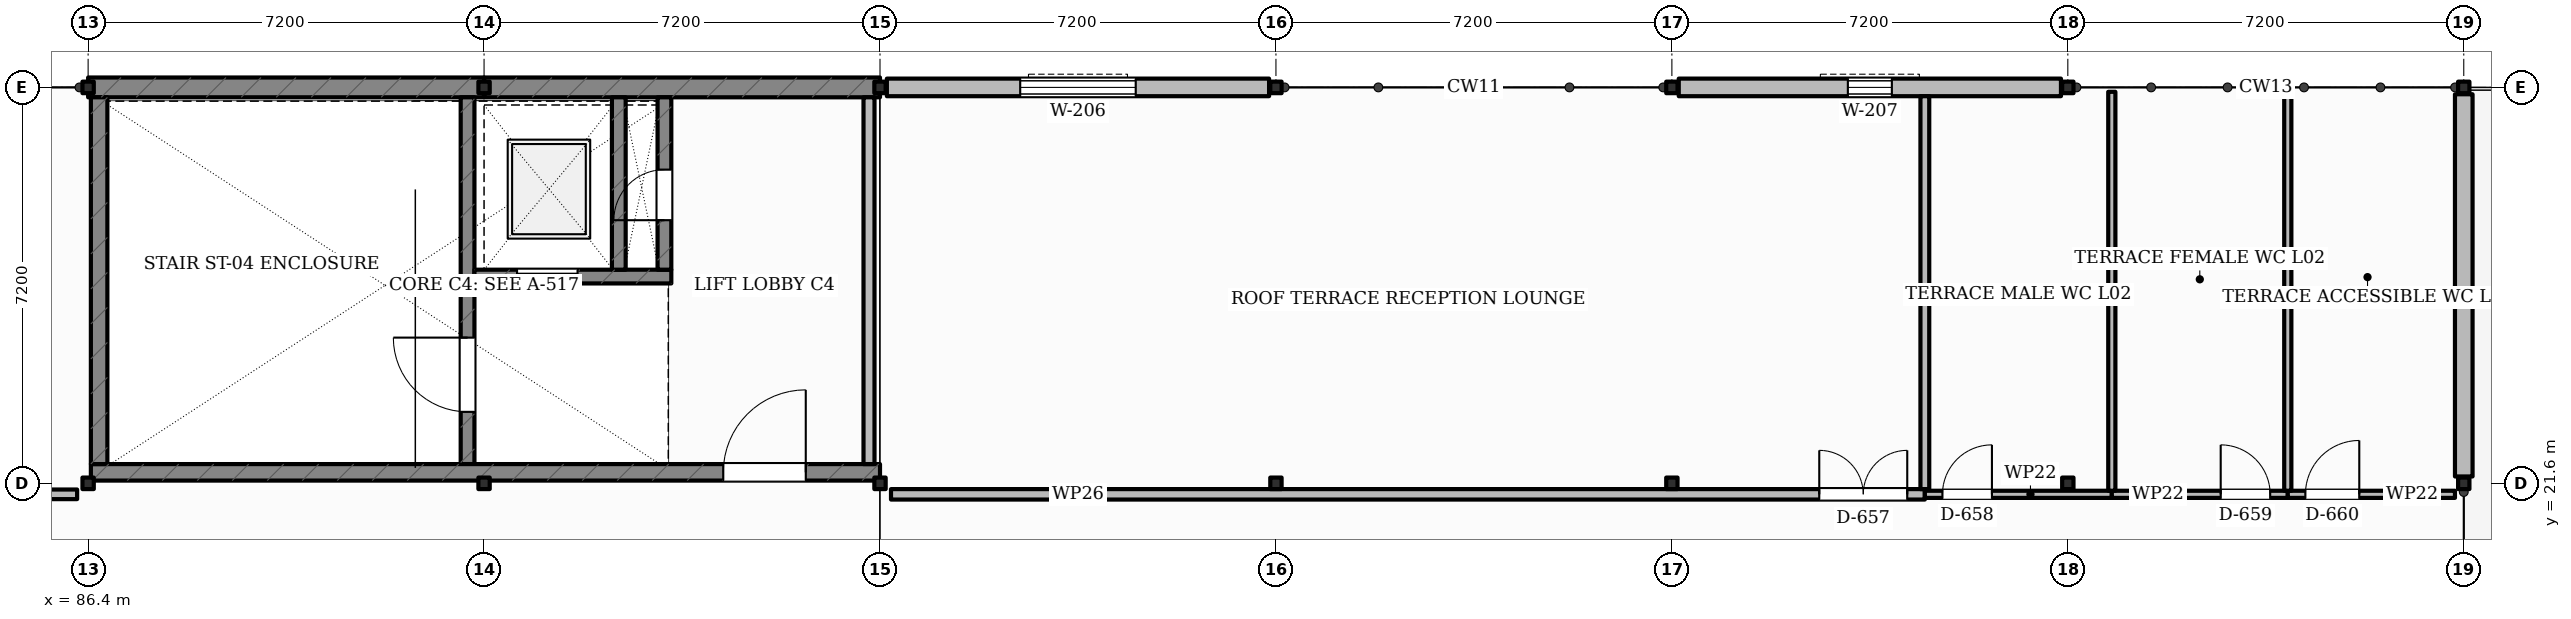
"""IFC4 building model, lengths in metres.
Left out: names, types, materials, properties, quantities, classifications, styles, units other than length and angle.
Written with IfcOpenShell. Run it as: python <this file> out.ifc"""

import sys

from ifc_helpers import new_model, si_unit, direction, frame, frame_2d, origin, origin_2d, place, context, subcontext, project, spatial, rectangle, i_section, extrude, element, fill, save


model = new_model("IFC4")
c1 = context("Model", 3, precision=1e-05, world=origin(), true_north=direction((0.0, 1.0)))
c2 = subcontext(c1, "Body", "Model", "MODEL_VIEW")
j1 = project(units=[si_unit("LENGTHUNIT", "METRE"), si_unit("PLANEANGLEUNIT", "RADIAN")], contexts=[c1])
p1 = place(None, origin())
s1 = spatial("IfcSite", under=j1, at=p1, CompositionType="ELEMENT")
p2 = place(p1, origin())
s2 = spatial("IfcBuilding", under=s1, at=p2, CompositionType="ELEMENT")
p3 = place(p2, frame((0.0, 0.0, 9.9)))
s3 = spatial("IfcBuildingStorey", under=s2, at=p3, CompositionType="ELEMENT", Elevation=9.9)
for number, where, z_axis, x_axis in (
    (1, (86.4, 21.6, 0.0), (0.0, 0.0, 1.0), (1.0, 0.0, 0.0)),
    (2, (86.4, 28.8, 0.0), (0.0, 0.0, 1.0), (1.0, 0.0, 0.0)),
    (3, (93.6, 21.6, 0.0), (0.0, 0.0, 1.0), (1.0, 0.0, 0.0)),
    (4, (93.6, 28.8, 0.0), (0.0, 0.0, 1.0), (1.0, 0.0, 0.0)),
    (5, (100.8, 21.6, 0.0), (0.0, 0.0, 1.0), (1.0, 0.0, 0.0)),
    (6, (100.8, 28.8, 0.0), (0.0, 0.0, 1.0), (1.0, 0.0, 0.0)),
    (7, (108.0, 21.6, 0.0), (0.0, 0.0, 1.0), (1.0, 0.0, 0.0)),
    (8, (108.0, 28.8, 0.0), (0.0, 0.0, 1.0), (1.0, 0.0, 0.0)),
    (9, (115.2, 21.6, 0.0), (0.0, 0.0, 1.0), (1.0, 0.0, 0.0)),
    (10, (115.2, 28.8, 0.0), (0.0, 0.0, 1.0), (1.0, 0.0, 0.0)),
    (11, (122.4, 21.6, 0.0), (0.0, 0.0, 1.0), (1.0, 0.0, 0.0)),
    (12, (122.4, 28.8, 0.0), (0.0, 0.0, 1.0), (1.0, 0.0, 0.0)),
    (13, (129.6, 21.6, 0.0), (0.0, 0.0, 1.0), (1.0, 0.0, 0.0)),
    (14, (129.6, 28.8, 0.0), (0.0, 0.0, 1.0), (1.0, 0.0, 0.0)),
):
    element("IfcColumn", number, at=place(p3, frame(where, z_axis=z_axis, x_axis=x_axis)), inside=s3, PredefinedType="COLUMN", context=c2, shape_type="SweptSolid", body=[
        extrude(i_section(OverallWidth=0.206, OverallDepth=0.21, WebThickness=0.01, FlangeThickness=0.014, FilletRadius=0.01, at=origin_2d()), origin(), (0.0, 0.0, 1.0), 4.5),
    ])
p4 = place(p3, frame((86.4, 28.8, 0.0), z_axis=(0.0, 0.0, 1.0), x_axis=(1.0, 0.0, 0.0)))
e15 = element("IfcWall", 15, at=p4, inside=s3, PredefinedType="SHEAR", context=c2, shape_type="SweptSolid", body=[
    extrude(rectangle(XDim=7.2, YDim=0.36, at=frame_2d((3.6, 0.0))), origin(), (0.0, 0.0, 1.0), 3.605),
])
p5 = place(p3, frame((93.6, 28.8, 0.0), z_axis=(0.0, 0.0, 1.0), x_axis=(1.0, 0.0, 0.0)))
e16 = element("IfcWall", 16, at=p5, inside=s3, PredefinedType="SHEAR", context=c2, shape_type="SweptSolid", body=[
    extrude(rectangle(XDim=7.2, YDim=0.36, at=frame_2d((3.6, 0.0))), origin(), (0.0, 0.0, 1.0), 3.455),
])
p6 = place(p3, frame((100.925, 28.8, 0.0), z_axis=(0.0, 0.0, 1.0), x_axis=(1.0, 0.0, 0.0)))
e17 = element("IfcWall", 17, at=p6, inside=s3, PredefinedType="SOLIDWALL", context=c2, shape_type="SweptSolid", body=[
    extrude(rectangle(XDim=6.95, YDim=0.32, at=frame_2d((3.475, 0.0))), origin(), (0.0, 0.0, 1.0), 3.455),
])
p7 = place(p6, frame((2.425, 0.0, 1.05)))
e18 = element("IfcOpeningElement", 18, at=p7, cuts=e17, PredefinedType="OPENING", context=c2, shape_type="SweptSolid", body=[
    extrude(rectangle(XDim=2.1, YDim=1.8, at=frame_2d((1.05, 0.9))), frame((0.0, 0.17, 0.0), z_axis=(0.0, -1.0, 0.0), x_axis=(1.0, 0.0, 0.0)), (0.0, 0.0, 1.0), 0.34),
])
p8 = place(p3, frame((115.325, 28.8, 0.0), z_axis=(0.0, 0.0, 1.0), x_axis=(1.0, 0.0, 0.0)))
e19 = element("IfcWall", 19, at=p8, inside=s3, PredefinedType="SOLIDWALL", context=c2, shape_type="SweptSolid", body=[
    extrude(rectangle(XDim=6.95, YDim=0.32, at=frame_2d((3.475, 0.0))), origin(), (0.0, 0.0, 1.0), 3.605),
])
p9 = place(p8, frame((3.075, 0.0, 1.05)))
e20 = element("IfcOpeningElement", 20, at=p9, cuts=e19, PredefinedType="OPENING", context=c2, shape_type="SweptSolid", body=[
    extrude(rectangle(XDim=0.8, YDim=1.4, at=frame_2d((0.4, 0.7))), frame((0.0, 0.17, 0.0), z_axis=(0.0, -1.0, 0.0), x_axis=(1.0, 0.0, 0.0)), (0.0, 0.0, 1.0), 0.34),
])
p10 = place(p3, frame((129.6, 28.675, 0.0), z_axis=(0.0, 0.0, 1.0), x_axis=(0.0, -1.0, 0.0)))
e21 = element("IfcWall", 21, at=p10, inside=s3, PredefinedType="SOLIDWALL", context=c2, shape_type="SweptSolid", body=[
    extrude(rectangle(XDim=6.95, YDim=0.32, at=frame_2d((3.475, 0.0))), origin(), (0.0, 0.0, 1.0), 3.655),
])
p11 = place(p3, frame((93.3, 21.95, 0.0), z_axis=(0.0, 0.0, 1.0), x_axis=(0.0, 1.0, 0.0)))
e22 = element("IfcWall", 22, at=p11, inside=s3, PredefinedType="SHEAR", context=c2, shape_type="SweptSolid", body=[
    extrude(rectangle(XDim=6.67, YDim=0.25, at=frame_2d((3.335, 0.0))), origin(), (0.0, 0.0, 1.0), 3.6),
])
p12 = place(p11, frame((0.95, 0.0, 0.0)))
e23 = element("IfcOpeningElement", 23, at=p12, cuts=e22, PredefinedType="OPENING", context=c2, shape_type="SweptSolid", body=[
    extrude(rectangle(XDim=1.35, YDim=2.15, at=frame_2d((0.675, 1.075))), frame((0.0, 0.135, 0.0), z_axis=(0.0, -1.0, 0.0), x_axis=(1.0, 0.0, 0.0)), (0.0, 0.0, 1.0), 0.27),
])
p13 = place(p3, frame((93.425, 25.36, 0.0), z_axis=(0.0, 0.0, 1.0), x_axis=(1.0, 0.0, 0.0)))
e24 = element("IfcWall", 24, at=p13, inside=s3, PredefinedType="SHEAR", context=c2, shape_type="SweptSolid", body=[
    extrude(rectangle(XDim=3.58, YDim=0.25, at=frame_2d((1.79, 0.0))), origin(), (0.0, 0.0, 1.0), 3.6),
])
p14 = place(p13, frame((0.775, 0.0, 0.0)))
e25 = element("IfcOpeningElement", 25, at=p14, cuts=e24, PredefinedType="OPENING", context=c2, shape_type="SweptSolid", body=[
    extrude(rectangle(XDim=1.1, YDim=2.15, at=frame_2d((0.55, 1.075))), frame((0.0, 0.135, 0.0), z_axis=(0.0, -1.0, 0.0), x_axis=(1.0, 0.0, 0.0)), (0.0, 0.0, 1.0), 0.27),
])
p15 = place(p3, frame((96.05, 25.485, 0.0), z_axis=(0.0, 0.0, 1.0), x_axis=(0.0, 1.0, 0.0)))
e26 = element("IfcWall", 26, at=p15, inside=s3, PredefinedType="SHEAR", context=c2, shape_type="SweptSolid", body=[
    extrude(rectangle(XDim=3.135, YDim=0.25, at=frame_2d((1.567, 0.0))), origin(), (0.0, 0.0, 1.0), 3.6),
])
p16 = place(p3, frame((96.88, 25.485, 0.0), z_axis=(0.0, 0.0, 1.0), x_axis=(0.0, 1.0, 0.0)))
e27 = element("IfcWall", 27, at=p16, inside=s3, PredefinedType="SHEAR", context=c2, shape_type="SweptSolid", body=[
    extrude(rectangle(XDim=3.135, YDim=0.25, at=frame_2d((1.567, 0.0))), origin(), (0.0, 0.0, 1.0), 3.6),
])
p17 = place(p16, frame((0.9, 0.0, 0.0)))
e28 = element("IfcOpeningElement", 28, at=p17, cuts=e27, PredefinedType="OPENING", context=c2, shape_type="SweptSolid", body=[
    extrude(rectangle(XDim=0.92, YDim=2.05, at=frame_2d((0.46, 1.025))), frame((0.0, 0.135, 0.0), z_axis=(0.0, -1.0, 0.0), x_axis=(1.0, 0.0, 0.0)), (0.0, 0.0, 1.0), 0.27),
])
p18 = place(p3, frame((86.45, 21.8, 0.0), z_axis=(0.0, 0.0, 1.0), x_axis=(1.0, 0.0, 0.0)))
e29 = element("IfcWall", 29, at=p18, inside=s3, PredefinedType="SHEAR", context=c2, shape_type="SweptSolid", body=[
    extrude(rectangle(XDim=14.35, YDim=0.3, at=frame_2d((7.175, 0.0))), origin(), (0.0, 0.0, 1.0), 3.6),
])
p19 = place(p18, frame((11.5, 0.0, 0.0)))
e30 = element("IfcOpeningElement", 30, at=p19, cuts=e29, PredefinedType="OPENING", context=c2, shape_type="SweptSolid", body=[
    extrude(rectangle(XDim=1.5, YDim=2.15, at=frame_2d((0.75, 1.075))), frame((0.0, 0.16, 0.0), z_axis=(0.0, -1.0, 0.0), x_axis=(1.0, 0.0, 0.0)), (0.0, 0.0, 1.0), 0.32),
])
p20 = place(p3, frame((86.6, 21.95, 0.0), z_axis=(0.0, 0.0, 1.0), x_axis=(0.0, 1.0, 0.0)))
e31 = element("IfcWall", 31, at=p20, inside=s3, PredefinedType="SHEAR", context=c2, shape_type="SweptSolid", body=[
    extrude(rectangle(XDim=6.67, YDim=0.3, at=frame_2d((3.335, 0.0))), origin(), (0.0, 0.0, 1.0), 3.6),
])
p21 = place(p3, frame((100.6, 21.95, 0.0), z_axis=(0.0, 0.0, 1.0), x_axis=(0.0, 1.0, 0.0)))
e32 = element("IfcWall", 32, at=p21, inside=s3, PredefinedType="SOLIDWALL", context=c2, shape_type="SweptSolid", body=[
    extrude(rectangle(XDim=6.67, YDim=0.2, at=frame_2d((3.335, 0.0))), origin(), (0.0, 0.0, 1.0), 3.45),
])
p22 = place(p3, frame((57.76, 21.4, 0.0), z_axis=(0.0, 0.0, 1.0), x_axis=(1.0, 0.0, 0.0)))
e33 = element("IfcWall", 33, at=p22, inside=s3, PredefinedType="PARTITIONING", context=c2, shape_type="SweptSolid", body=[
    extrude(rectangle(XDim=28.44, YDim=0.175, at=frame_2d((14.22, 0.0))), origin(), (0.0, 0.0, 1.0), 3.55),
])
p23 = place(p22, frame((16.948, 0.0, 0.0)))
e34 = element("IfcOpeningElement", 34, at=p23, cuts=e33, PredefinedType="OPENING", context=c2, shape_type="SweptSolid", body=[
    extrude(rectangle(XDim=1.22, YDim=2.2, at=frame_2d((0.61, 1.1))), frame((0.0, 0.097, 0.0), z_axis=(0.0, -1.0, 0.0), x_axis=(1.0, 0.0, 0.0)), (0.0, 0.0, 1.0), 0.195),
])
p24 = place(p3, frame((101.0, 21.4, 0.0), z_axis=(0.0, 0.0, 1.0), x_axis=(1.0, 0.0, 0.0)))
e35 = element("IfcWall", 35, at=p24, inside=s3, PredefinedType="PARTITIONING", context=c2, shape_type="SweptSolid", body=[
    extrude(rectangle(XDim=18.8, YDim=0.19, at=frame_2d((9.4, 0.0))), origin(), (0.0, 0.0, 1.0), 3.55),
])
p25 = place(p24, frame((16.88, 0.0, 0.0)))
e36 = element("IfcOpeningElement", 36, at=p25, cuts=e35, PredefinedType="OPENING", context=c2, shape_type="SweptSolid", body=[
    extrude(rectangle(XDim=1.6, YDim=2.2, at=frame_2d((0.8, 1.1))), frame((0.0, 0.105, 0.0), z_axis=(0.0, -1.0, 0.0), x_axis=(1.0, 0.0, 0.0)), (0.0, 0.0, 1.0), 0.21),
])
p26 = place(p3, frame((119.8, 21.4, 0.0), z_axis=(0.0, 0.0, 1.0), x_axis=(1.0, 0.0, 0.0)))
e37 = element("IfcWall", 37, at=p26, inside=s3, PredefinedType="PARTITIONING", context=c2, shape_type="SweptSolid", body=[
    extrude(rectangle(XDim=3.4, YDim=0.13, at=frame_2d((1.7, 0.0))), origin(), (0.0, 0.0, 1.0), 3.55),
])
p27 = place(p26, frame((0.32, 0.0, 0.0)))
e38 = element("IfcOpeningElement", 38, at=p27, cuts=e37, PredefinedType="OPENING", context=c2, shape_type="SweptSolid", body=[
    extrude(rectangle(XDim=0.9, YDim=2.05, at=frame_2d((0.45, 1.025))), frame((0.0, 0.075, 0.0), z_axis=(0.0, -1.0, 0.0), x_axis=(1.0, 0.0, 0.0)), (0.0, 0.0, 1.0), 0.15),
])
p28 = place(p3, frame((123.2, 21.4, 0.0), z_axis=(0.0, 0.0, 1.0), x_axis=(1.0, 0.0, 0.0)))
e39 = element("IfcWall", 39, at=p28, inside=s3, PredefinedType="PARTITIONING", context=c2, shape_type="SweptSolid", body=[
    extrude(rectangle(XDim=3.2, YDim=0.13, at=frame_2d((1.6, 0.0))), origin(), (0.0, 0.0, 1.0), 3.55),
])
p29 = place(p28, frame((1.98, 0.0, 0.0)))
e40 = element("IfcOpeningElement", 40, at=p29, cuts=e39, PredefinedType="OPENING", context=c2, shape_type="SweptSolid", body=[
    extrude(rectangle(XDim=0.9, YDim=2.05, at=frame_2d((0.45, 1.025))), frame((0.0, 0.075, 0.0), z_axis=(0.0, -1.0, 0.0), x_axis=(1.0, 0.0, 0.0)), (0.0, 0.0, 1.0), 0.15),
])
p30 = place(p3, frame((126.4, 21.4, 0.0), z_axis=(0.0, 0.0, 1.0), x_axis=(1.0, 0.0, 0.0)))
e41 = element("IfcWall", 41, at=p30, inside=s3, PredefinedType="PARTITIONING", context=c2, shape_type="SweptSolid", body=[
    extrude(rectangle(XDim=3.04, YDim=0.13, at=frame_2d((1.52, 0.0))), origin(), (0.0, 0.0, 1.0), 3.55),
])
p31 = place(p30, frame((0.32, 0.0, 0.0)))
e42 = element("IfcOpeningElement", 42, at=p31, cuts=e41, PredefinedType="OPENING", context=c2, shape_type="SweptSolid", body=[
    extrude(rectangle(XDim=0.98, YDim=2.1, at=frame_2d((0.49, 1.05))), frame((0.0, 0.075, 0.0), z_axis=(0.0, -1.0, 0.0), x_axis=(1.0, 0.0, 0.0)), (0.0, 0.0, 1.0), 0.15),
])
p32 = place(p3, frame((119.8, 21.495, 0.0), z_axis=(0.0, 0.0, 1.0), x_axis=(0.0, 1.0, 0.0)))
e43 = element("IfcWall", 43, at=p32, inside=s3, PredefinedType="PARTITIONING", context=c2, shape_type="SweptSolid", body=[
    extrude(rectangle(XDim=7.145, YDim=0.16, at=frame_2d((3.572, 0.0))), origin(), (0.0, 0.0, 1.0), 3.55),
])
for number, where, z_axis, x_axis in (
    (44, (123.2, 21.465, 0.0), (0.0, 0.0, 1.0), (0.0, 1.0, 0.0)),
    (45, (126.4, 21.465, 0.0), (0.0, 0.0, 1.0), (0.0, 1.0, 0.0)),
):
    element("IfcWall", number, at=place(p3, frame(where, z_axis=z_axis, x_axis=x_axis)), inside=s3, PredefinedType="PARTITIONING", context=c2, shape_type="SweptSolid", body=[
        extrude(rectangle(XDim=7.255, YDim=0.13, at=frame_2d((3.627, 0.0))), origin(), (0.0, 0.0, 1.0), 3.55),
    ])
p33 = place(p7, origin())
e46 = element("IfcWindow", 46, at=p33, inside=s3, PartitioningType="SINGLE_PANEL", PredefinedType="WINDOW", context=c2, shape_type="SweptSolid", body=[
    extrude(rectangle(XDim=2.1, YDim=1.8, at=frame_2d((1.05, 0.9))), frame((0.0, 0.03, 0.0), z_axis=(0.0, -1.0, 0.0), x_axis=(1.0, 0.0, 0.0)), (0.0, 0.0, 1.0), 0.06),
])
fill(e18, e46)
p34 = place(p9, origin())
e47 = element("IfcWindow", 47, at=p34, inside=s3, PartitioningType="SINGLE_PANEL", PredefinedType="WINDOW", context=c2, shape_type="SweptSolid", body=[
    extrude(rectangle(XDim=0.8, YDim=1.4, at=frame_2d((0.4, 0.7))), frame((0.0, 0.03, 0.0), z_axis=(0.0, -1.0, 0.0), x_axis=(1.0, 0.0, 0.0)), (0.0, 0.0, 1.0), 0.06),
])
fill(e20, e47)
p35 = place(p12, origin())
e48 = element("IfcDoor", 48, at=p35, inside=s3, OperationType="SINGLE_SWING_RIGHT", PredefinedType="DOOR", context=c2, shape_type="SweptSolid", body=[
    extrude(rectangle(XDim=1.35, YDim=2.15, at=frame_2d((0.675, 1.075))), frame((0.0, 0.025, 0.0), z_axis=(0.0, -1.0, 0.0), x_axis=(1.0, 0.0, 0.0)), (0.0, 0.0, 1.0), 0.05),
])
fill(e23, e48)
p36 = place(p14, origin())
e49 = element("IfcDoor", 49, at=p36, inside=s3, OperationType="SLIDING_TO_LEFT", PredefinedType="DOOR", context=c2, shape_type="SweptSolid", body=[
    extrude(rectangle(XDim=1.1, YDim=2.15, at=frame_2d((0.55, 1.075))), frame((0.0, 0.025, 0.0), z_axis=(0.0, -1.0, 0.0), x_axis=(1.0, 0.0, 0.0)), (0.0, 0.0, 1.0), 0.05),
])
fill(e25, e49)
p37 = place(p17, origin())
e50 = element("IfcDoor", 50, at=p37, inside=s3, OperationType="SINGLE_SWING_LEFT", PredefinedType="DOOR", context=c2, shape_type="SweptSolid", body=[
    extrude(rectangle(XDim=0.92, YDim=2.05, at=frame_2d((0.46, 1.025))), frame((0.0, 0.025, 0.0), z_axis=(0.0, -1.0, 0.0), x_axis=(1.0, 0.0, 0.0)), (0.0, 0.0, 1.0), 0.05),
])
fill(e28, e50)
p38 = place(p19, origin())
e51 = element("IfcDoor", 51, at=p38, inside=s3, OperationType="SINGLE_SWING_RIGHT", PredefinedType="DOOR", context=c2, shape_type="SweptSolid", body=[
    extrude(rectangle(XDim=1.5, YDim=2.15, at=frame_2d((0.75, 1.075))), frame((0.0, 0.025, 0.0), z_axis=(0.0, -1.0, 0.0), x_axis=(1.0, 0.0, 0.0)), (0.0, 0.0, 1.0), 0.05),
])
fill(e30, e51)
p39 = place(p25, origin())
e52 = element("IfcDoor", 52, at=p39, inside=s3, OperationType="DOUBLE_SWING_LEFT", PredefinedType="DOOR", context=c2, shape_type="SweptSolid", body=[
    extrude(rectangle(XDim=1.6, YDim=2.2, at=frame_2d((0.8, 1.1))), frame((0.0, 0.025, 0.0), z_axis=(0.0, -1.0, 0.0), x_axis=(1.0, 0.0, 0.0)), (0.0, 0.0, 1.0), 0.05),
])
fill(e36, e52)
p40 = place(p27, origin())
e53 = element("IfcDoor", 53, at=p40, inside=s3, OperationType="SINGLE_SWING_RIGHT", PredefinedType="DOOR", context=c2, shape_type="SweptSolid", body=[
    extrude(rectangle(XDim=0.9, YDim=2.05, at=frame_2d((0.45, 1.025))), frame((0.0, 0.025, 0.0), z_axis=(0.0, -1.0, 0.0), x_axis=(1.0, 0.0, 0.0)), (0.0, 0.0, 1.0), 0.05),
])
fill(e38, e53)
p41 = place(p29, origin())
e54 = element("IfcDoor", 54, at=p41, inside=s3, OperationType="SINGLE_SWING_LEFT", PredefinedType="DOOR", context=c2, shape_type="SweptSolid", body=[
    extrude(rectangle(XDim=0.9, YDim=2.05, at=frame_2d((0.45, 1.025))), frame((0.0, 0.025, 0.0), z_axis=(0.0, -1.0, 0.0), x_axis=(1.0, 0.0, 0.0)), (0.0, 0.0, 1.0), 0.05),
])
fill(e40, e54)
p42 = place(p31, origin())
e55 = element("IfcDoor", 55, at=p42, inside=s3, OperationType="SINGLE_SWING_RIGHT", PredefinedType="DOOR", context=c2, shape_type="SweptSolid", body=[
    extrude(rectangle(XDim=0.98, YDim=2.1, at=frame_2d((0.49, 1.05))), frame((0.0, 0.025, 0.0), z_axis=(0.0, -1.0, 0.0), x_axis=(1.0, 0.0, 0.0)), (0.0, 0.0, 1.0), 0.05),
])
fill(e42, e55)
save(model, sys.argv[1])
